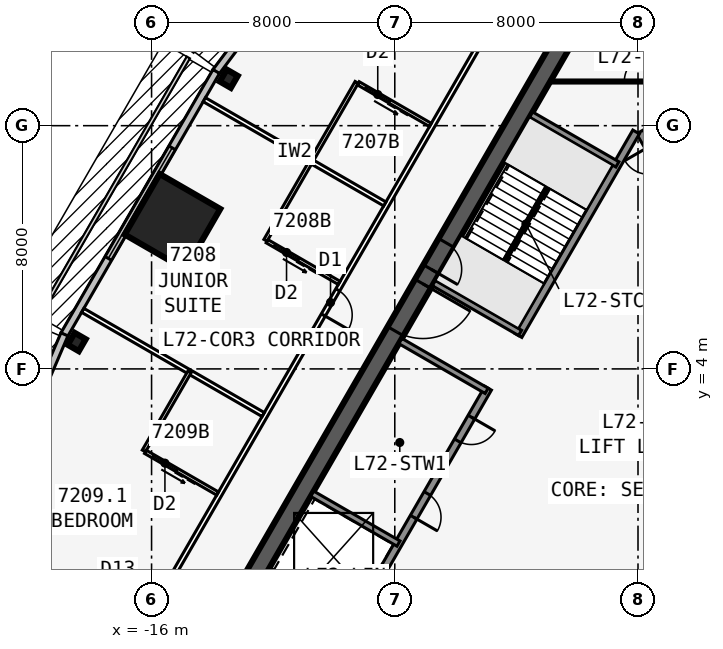
"""IFC4 building model, lengths in metres.
Left out: names, types, materials, properties, quantities, classifications, styles, units other than length and angle.
Written with IfcOpenShell. Run it as: python <this file> out.ifc"""

import sys

from ifc_helpers import new_model, si_unit, direction, frame, frame_2d, origin, origin_2d, place, context, subcontext, project, spatial, rectangle, i_section, extrude, element, fill, save


model = new_model("IFC4")
c1 = context("Model", 3, precision=1e-05, world=origin(), true_north=direction((0.0, 1.0)))
c2 = subcontext(c1, "Body", "Model", "MODEL_VIEW")
j1 = project(units=[si_unit("LENGTHUNIT", "METRE"), si_unit("PLANEANGLEUNIT", "RADIAN")], contexts=[c1])
p1 = place(None, origin())
s1 = spatial("IfcSite", under=j1, at=p1, CompositionType="ELEMENT")
p2 = place(p1, origin())
s2 = spatial("IfcBuilding", under=s1, at=p2, CompositionType="ELEMENT")
p3 = place(p2, frame((0.0, 0.0, 271.7)))
s3 = spatial("IfcBuildingStorey", under=s2, at=p3, CompositionType="ELEMENT", Elevation=271.7)
p4 = place(p3, frame((16.5, -9.526, 0.0), z_axis=(0.0, 0.0, 1.0), x_axis=(-0.499999749417, 0.866025548458, 0.0)))
e1 = element("IfcWall", 1, at=p4, inside=s3, PredefinedType="SHEAR", context=c2, shape_type="SweptSolid", body=[
    extrude(rectangle(XDim=33.0, YDim=0.6, at=frame_2d((16.5, 0.0))), origin(), (0.0, 0.0, 1.0), 3.6),
])
p5 = place(p4, frame((14.15, 0.0, 0.0)))
e2 = element("IfcOpeningElement", 2, at=p5, cuts=e1, PredefinedType="OPENING", context=c2, shape_type="SweptSolid", body=[
    extrude(rectangle(XDim=1.8, YDim=2.13, at=frame_2d((0.9, 1.065))), frame((0.0, 0.31, 0.0), z_axis=(0.0, -1.0, 0.0), x_axis=(1.0, 0.0, 0.0)), (0.0, 0.0, 1.0), 0.62),
])
p6 = place(p4, frame((12.6, 0.0, 0.0)))
e3 = element("IfcOpeningElement", 3, at=p6, cuts=e1, PredefinedType="OPENING", context=c2, shape_type="SweptSolid", body=[
    extrude(rectangle(XDim=1.0, YDim=2.13, at=frame_2d((0.5, 1.065))), frame((0.0, 0.31, 0.0), z_axis=(0.0, -1.0, 0.0), x_axis=(1.0, 0.0, 0.0)), (0.0, 0.0, 1.0), 0.62),
])
p7 = place(p3, frame((5.379, 2.586, 0.0), z_axis=(0.0, 0.0, 1.0), x_axis=(-0.500001375892, 0.866024609411, 0.0)))
e4 = element("IfcWall", 4, at=p7, inside=s3, PredefinedType="SOLIDWALL", context=c2, shape_type="SweptSolid", body=[
    extrude(rectangle(XDim=10.633, YDim=0.25, at=frame_2d((5.316, 0.0))), origin(), (0.0, 0.0, 1.0), 3.35),
])
p8 = place(p7, frame((9.164, 0.0, 0.0)))
e5 = element("IfcOpeningElement", 5, at=p8, cuts=e4, PredefinedType="OPENING", context=c2, shape_type="SweptSolid", body=[
    extrude(rectangle(XDim=0.9, YDim=2.13, at=frame_2d((0.45, 1.065))), frame((0.0, 0.135, 0.0), z_axis=(0.0, -1.0, 0.0), x_axis=(1.0, 0.0, 0.0)), (0.0, 0.0, 1.0), 0.27),
])
p9 = place(p7, frame((1.0, 0.0, 0.0)))
e6 = element("IfcOpeningElement", 6, at=p9, cuts=e4, PredefinedType="OPENING", context=c2, shape_type="SweptSolid", body=[
    extrude(rectangle(XDim=1.1, YDim=2.13, at=frame_2d((0.55, 1.065))), frame((0.0, 0.135, 0.0), z_axis=(0.0, -1.0, 0.0), x_axis=(1.0, 0.0, 0.0)), (0.0, 0.0, 1.0), 0.27),
])
p10 = place(p7, frame((3.9, 0.0, 0.0)))
e7 = element("IfcOpeningElement", 7, at=p10, cuts=e4, PredefinedType="OPENING", context=c2, shape_type="SweptSolid", body=[
    extrude(rectangle(XDim=1.1, YDim=2.13, at=frame_2d((0.55, 1.065))), frame((0.0, 0.135, 0.0), z_axis=(0.0, -1.0, 0.0), x_axis=(1.0, 0.0, 0.0)), (0.0, 0.0, 1.0), 0.27),
])
p11 = place(p7, frame((6.8, 0.0, 0.0)))
e8 = element("IfcOpeningElement", 8, at=p11, cuts=e4, PredefinedType="OPENING", context=c2, shape_type="SweptSolid", body=[
    extrude(rectangle(XDim=1.1, YDim=2.13, at=frame_2d((0.55, 1.065))), frame((0.0, 0.135, 0.0), z_axis=(0.0, -1.0, 0.0), x_axis=(1.0, 0.0, 0.0)), (0.0, 0.0, 1.0), 0.27),
])
p12 = place(p3, frame((0.0, 19.052, 0.0), z_axis=(0.0, 0.0, 1.0), x_axis=(-0.499999749417, -0.866025548458, 0.0)))
e9 = element("IfcWall", 9, at=p12, inside=s3, PredefinedType="SHEAR", context=c2, shape_type="SweptSolid", body=[
    extrude(rectangle(XDim=33.0, YDim=0.6, at=frame_2d((16.5, 0.0))), origin(), (0.0, 0.0, 1.0), 3.6),
])
p13 = place(p12, frame((14.15, 0.0, 0.0)))
e10 = element("IfcOpeningElement", 10, at=p13, cuts=e9, PredefinedType="OPENING", context=c2, shape_type="SweptSolid", body=[
    extrude(rectangle(XDim=1.8, YDim=2.13, at=frame_2d((0.9, 1.065))), frame((0.0, 0.31, 0.0), z_axis=(0.0, -1.0, 0.0), x_axis=(1.0, 0.0, 0.0)), (0.0, 0.0, 1.0), 0.62),
])
p14 = place(p12, frame((12.6, 0.0, 0.0)))
e11 = element("IfcOpeningElement", 11, at=p14, cuts=e9, PredefinedType="OPENING", context=c2, shape_type="SweptSolid", body=[
    extrude(rectangle(XDim=1.0, YDim=2.13, at=frame_2d((0.5, 1.065))), frame((0.0, 0.31, 0.0), z_axis=(0.0, -1.0, 0.0), x_axis=(1.0, 0.0, 0.0)), (0.0, 0.0, 1.0), 0.62),
])
p15 = place(p3, frame((-0.062, 11.794, 0.0), z_axis=(0.0, 0.0, 1.0), x_axis=(-0.500006680225, -0.86602154692, 0.0)))
e12 = element("IfcWall", 12, at=p15, inside=s3, PredefinedType="SOLIDWALL", context=c2, shape_type="SweptSolid", body=[
    extrude(rectangle(XDim=7.733, YDim=0.25, at=frame_2d((3.866, 0.0))), origin(), (0.0, 0.0, 1.0), 3.35),
])
p16 = place(p3, frame((-4.929, 3.365, 0.0), z_axis=(0.0, 0.0, 1.0), x_axis=(-0.499991433582, -0.866030349552, 0.0)))
e13 = element("IfcWall", 13, at=p16, inside=s3, PredefinedType="SOLIDWALL", context=c2, shape_type="SweptSolid", body=[
    extrude(rectangle(XDim=10.633, YDim=0.25, at=frame_2d((5.316, 0.0))), origin(), (0.0, 0.0, 1.0), 3.35),
])
p17 = place(p16, frame((9.164, 0.0, 0.0)))
e14 = element("IfcOpeningElement", 14, at=p17, cuts=e13, PredefinedType="OPENING", context=c2, shape_type="SweptSolid", body=[
    extrude(rectangle(XDim=0.9, YDim=2.13, at=frame_2d((0.45, 1.065))), frame((0.0, 0.135, 0.0), z_axis=(0.0, -1.0, 0.0), x_axis=(1.0, 0.0, 0.0)), (0.0, 0.0, 1.0), 0.27),
])
p18 = place(p16, frame((1.1, 0.0, 0.0)))
e15 = element("IfcOpeningElement", 15, at=p18, cuts=e13, PredefinedType="OPENING", context=c2, shape_type="SweptSolid", body=[
    extrude(rectangle(XDim=0.9, YDim=2.13, at=frame_2d((0.45, 1.065))), frame((0.0, 0.135, 0.0), z_axis=(0.0, -1.0, 0.0), x_axis=(1.0, 0.0, 0.0)), (0.0, 0.0, 1.0), 0.27),
])
p19 = place(p16, frame((4.0, 0.0, 0.0)))
e16 = element("IfcOpeningElement", 16, at=p19, cuts=e13, PredefinedType="OPENING", context=c2, shape_type="SweptSolid", body=[
    extrude(rectangle(XDim=0.9, YDim=2.13, at=frame_2d((0.45, 1.065))), frame((0.0, 0.135, 0.0), z_axis=(0.0, -1.0, 0.0), x_axis=(1.0, 0.0, 0.0)), (0.0, 0.0, 1.0), 0.27),
])
for number, where, z_axis, x_axis in (
    (17, (-0.679, 10.727, 0.0), (0.0, 0.0, 1.0), (-0.866, 0.5, 0.0)),
    (18, (-3.879, 5.184, 0.0), (0.0, 0.0, 1.0), (-0.866, 0.5, 0.0)),
    (19, (-4.979, 3.279, 0.0), (0.0, 0.0, 1.0), (-0.866, 0.5, 0.0)),
    (20, (-7.879, -1.744, 0.0), (0.0, 0.0, 1.0), (-0.866, 0.5, 0.0)),
    (21, (-9.329, -4.256, 0.0), (0.0, 0.0, 1.0), (-0.866, 0.5, 0.0)),
):
    element("IfcWall", number, at=place(p3, frame(where, z_axis=z_axis, x_axis=x_axis)), inside=s3, PredefinedType="SOLIDWALL", context=c2, shape_type="SweptSolid", body=[
        extrude(rectangle(XDim=3.275, YDim=0.2, at=frame_2d((1.637, 0.0))), origin(), (0.0, 0.0, 1.0), 3.35),
    ])
for number, where, z_axis, x_axis in (
    (22, (-13.461, 13.545, 0.0), (0.0, 0.0, 1.0), (-0.866, 0.5, 0.0)),
    (23, (-18.461, 4.885, 0.0), (0.0, 0.0, 1.0), (-0.866, 0.5, 0.0)),
):
    element("IfcColumn", number, at=place(p3, frame(where, z_axis=z_axis, x_axis=x_axis)), inside=s3, PredefinedType="COLUMN", context=c2, shape_type="SweptSolid", body=[
        extrude(i_section(OverallWidth=0.419, OverallDepth=0.455, WebThickness=0.042, FlangeThickness=0.068, at=origin_2d()), origin(), (0.0, 0.0, 1.0), 3.6),
    ])
p20 = place(p3, frame((-15.312, 8.84, 0.0), z_axis=(0.0, 0.0, 1.0), x_axis=(-0.866025403784, 0.5, 0.0)))
e24 = element("IfcColumn", 24, at=p20, inside=s3, PredefinedType="COLUMN", context=c2, shape_type="SweptSolid", body=[
    extrude(rectangle(XDim=2.3, YDim=2.3, at=origin_2d()), origin(), (0.0, 0.0, 1.0), 3.6),
])
p21 = place(p3, frame((-12.673, 15.382, 0.0), z_axis=(0.0, 0.0, 1.0), x_axis=(-0.599650843534, -0.800261748335, 0.0)))
e25 = element("IfcWall", 25, at=p21, inside=s3, PredefinedType="STANDARD", context=c2, shape_type="SweptSolid", body=[
    extrude(rectangle(XDim=2.014, YDim=0.25, at=frame_2d((1.007, 0.0))), origin(), (0.0, 0.0, 1.0), 3.35),
])
p22 = place(p3, frame((-13.873, 13.783, 0.0), z_axis=(0.0, 0.0, 1.0), x_axis=(-0.499993662806, -0.866029062534, 0.0)))
e26 = element("IfcWall", 26, at=p22, inside=s3, PredefinedType="STANDARD", context=c2, shape_type="SweptSolid", body=[
    extrude(rectangle(XDim=10.0, YDim=0.25, at=frame_2d((5.0, 0.0))), origin(), (0.0, 0.0, 1.0), 3.35),
])
p23 = place(p22, frame((2.9, 0.0, 0.45)))
e27 = element("IfcOpeningElement", 27, at=p23, cuts=e26, PredefinedType="OPENING", context=c2, shape_type="SweptSolid", body=[
    extrude(rectangle(XDim=4.2, YDim=2.6, at=frame_2d((2.1, 1.3))), frame((0.0, 0.135, 0.0), z_axis=(0.0, -1.0, 0.0), x_axis=(1.0, 0.0, 0.0)), (0.0, 0.0, 1.0), 0.27),
])
p24 = place(p3, frame((-18.866, 5.136, 0.0), z_axis=(0.0, 0.0, 1.0), x_axis=(-0.393290226175, -0.91941437774, 0.0)))
e28 = element("IfcWall", 28, at=p24, inside=s3, PredefinedType="STANDARD", context=c2, shape_type="SweptSolid", body=[
    extrude(rectangle(XDim=2.014, YDim=0.25, at=frame_2d((1.007, 0.0))), origin(), (0.0, 0.0, 1.0), 3.35),
])
p25 = place(p3, frame((-0.35, 23.096, 0.0), z_axis=(0.0, 0.0, 1.0), x_axis=(-0.499998875317, -0.866026053119, 0.0)))
e29 = element("IfcWall", 29, at=p25, inside=s3, PredefinedType="PARTITIONING", context=c2, shape_type="SweptSolid", body=[
    extrude(rectangle(XDim=39.654, YDim=0.15, at=frame_2d((19.827, 0.0))), origin(), (0.0, 0.0, 1.0), 3.35),
])
p26 = place(p25, frame((3.272, 0.0, 0.0)))
e30 = element("IfcOpeningElement", 30, at=p26, cuts=e29, PredefinedType="OPENING", context=c2, shape_type="SweptSolid", body=[
    extrude(rectangle(XDim=0.95, YDim=2.13, at=frame_2d((0.475, 1.065))), frame((0.0, 0.085, 0.0), z_axis=(0.0, -1.0, 0.0), x_axis=(1.0, 0.0, 0.0)), (0.0, 0.0, 1.0), 0.17),
])
p27 = place(p25, frame((19.052, 0.0, 0.0)))
e31 = element("IfcOpeningElement", 31, at=p27, cuts=e29, PredefinedType="OPENING", context=c2, shape_type="SweptSolid", body=[
    extrude(rectangle(XDim=0.95, YDim=2.13, at=frame_2d((0.475, 1.065))), frame((0.0, 0.085, 0.0), z_axis=(0.0, -1.0, 0.0), x_axis=(1.0, 0.0, 0.0)), (0.0, 0.0, 1.0), 0.17),
])
p28 = place(p25, frame((35.432, 0.0, 0.0)))
e32 = element("IfcOpeningElement", 32, at=p28, cuts=e29, PredefinedType="OPENING", context=c2, shape_type="SweptSolid", body=[
    extrude(rectangle(XDim=0.95, YDim=2.13, at=frame_2d((0.475, 1.065))), frame((0.0, 0.085, 0.0), z_axis=(0.0, -1.0, 0.0), x_axis=(1.0, 0.0, 0.0)), (0.0, 0.0, 1.0), 0.17),
])
p29 = place(p3, frame((-8.329, 9.427, 0.0), z_axis=(0.0, 0.0, 1.0), x_axis=(-0.866011785882, 0.500023586156, 0.0)))
e33 = element("IfcWall", 33, at=p29, inside=s3, PredefinedType="PARTITIONING", context=c2, shape_type="SweptSolid", body=[
    extrude(rectangle(XDim=6.854, YDim=0.15, at=frame_2d((3.427, 0.0))), origin(), (0.0, 0.0, 1.0), 3.35),
])
p30 = place(p3, frame((-12.329, 2.499, 0.0), z_axis=(0.0, 0.0, 1.0), x_axis=(-0.866027209835, 0.499996871816, 0.0)))
e34 = element("IfcWall", 34, at=p30, inside=s3, PredefinedType="PARTITIONING", context=c2, shape_type="SweptSolid", body=[
    extrude(rectangle(XDim=6.854, YDim=0.15, at=frame_2d((3.427, 0.0))), origin(), (0.0, 0.0, 1.0), 3.35),
])
p31 = place(p3, frame((-16.329, -4.429, 0.0), z_axis=(0.0, 0.0, 1.0), x_axis=(-0.866029066823, 0.499993655377, 0.0)))
e35 = element("IfcWall", 35, at=p31, inside=s3, PredefinedType="PARTITIONING", context=c2, shape_type="SweptSolid", body=[
    extrude(rectangle(XDim=5.559, YDim=0.1, at=frame_2d((2.779, 0.0))), origin(), (0.0, 0.0, 1.0), 2.301),
])
p32 = place(p31, frame((0.45, 0.0, 0.0)))
e36 = element("IfcOpeningElement", 36, at=p32, cuts=e35, PredefinedType="OPENING", context=c2, shape_type="SweptSolid", body=[
    extrude(rectangle(XDim=0.9, YDim=2.13, at=frame_2d((0.45, 1.065))), frame((0.0, 0.06, 0.0), z_axis=(0.0, -1.0, 0.0), x_axis=(1.0, 0.0, 0.0)), (0.0, 0.0, 1.0), 0.12),
])
p33 = place(p3, frame((-9.253, 13.425, 0.0), z_axis=(0.0, 0.0, 1.0), x_axis=(-0.499990139034, -0.866031096941, 0.0)))
e37 = element("IfcWall", 37, at=p33, inside=s3, PredefinedType="PLUMBINGWALL", context=c2, shape_type="SweptSolid", body=[
    extrude(rectangle(XDim=3.0, YDim=0.12, at=frame_2d((1.5, 0.0))), origin(), (0.0, 0.0, 1.0), 3.35),
])
p34 = place(p3, frame((-6.829, 12.025, 0.0), z_axis=(0.0, 0.0, 1.0), x_axis=(-0.866035715982, 0.499982138324, 0.0)))
e38 = element("IfcWall", 38, at=p34, inside=s3, PredefinedType="PLUMBINGWALL", context=c2, shape_type="SweptSolid", body=[
    extrude(rectangle(XDim=2.74, YDim=0.12, at=frame_2d((1.37, 0.0))), origin(), (0.0, 0.0, 1.0), 2.309),
])
p35 = place(p34, frame((1.55, 0.0, 0.0)))
e39 = element("IfcOpeningElement", 39, at=p35, cuts=e38, PredefinedType="OPENING", context=c2, shape_type="SweptSolid", body=[
    extrude(rectangle(XDim=0.9, YDim=2.13, at=frame_2d((0.45, 1.065))), frame((0.0, 0.07, 0.0), z_axis=(0.0, -1.0, 0.0), x_axis=(1.0, 0.0, 0.0)), (0.0, 0.0, 1.0), 0.14),
])
p36 = place(p3, frame((-10.753, 10.827, 0.0), z_axis=(0.0, 0.0, 1.0), x_axis=(-0.50002537861, -0.866010750942, 0.0)))
e40 = element("IfcWall", 40, at=p36, inside=s3, PredefinedType="PLUMBINGWALL", context=c2, shape_type="SweptSolid", body=[
    extrude(rectangle(XDim=3.0, YDim=0.12, at=frame_2d((1.5, 0.0))), origin(), (0.0, 0.0, 1.0), 3.35),
])
p37 = place(p3, frame((-9.829, 6.829, 0.0), z_axis=(0.0, 0.0, 1.0), x_axis=(-0.865997131366, 0.500048966069, 0.0)))
e41 = element("IfcWall", 41, at=p37, inside=s3, PredefinedType="PLUMBINGWALL", context=c2, shape_type="SweptSolid", body=[
    extrude(rectangle(XDim=2.74, YDim=0.12, at=frame_2d((1.37, 0.0))), origin(), (0.0, 0.0, 1.0), 3.35),
])
p38 = place(p37, frame((1.55, 0.0, 0.0)))
e42 = element("IfcOpeningElement", 42, at=p38, cuts=e41, PredefinedType="OPENING", context=c2, shape_type="SweptSolid", body=[
    extrude(rectangle(XDim=0.9, YDim=2.13, at=frame_2d((0.45, 1.065))), frame((0.0, 0.07, 0.0), z_axis=(0.0, -1.0, 0.0), x_axis=(1.0, 0.0, 0.0)), (0.0, 0.0, 1.0), 0.14),
])
p39 = place(p3, frame((-14.753, 3.899, 0.0), z_axis=(0.0, 0.0, 1.0), x_axis=(-0.50002537861, -0.866010750942, 0.0)))
e43 = element("IfcWall", 43, at=p39, inside=s3, PredefinedType="PLUMBINGWALL", context=c2, shape_type="SweptSolid", body=[
    extrude(rectangle(XDim=3.0, YDim=0.12, at=frame_2d((1.5, 0.0))), origin(), (0.0, 0.0, 1.0), 3.35),
])
p40 = place(p3, frame((-13.829, -0.099, 0.0), z_axis=(0.0, 0.0, 1.0), x_axis=(-0.865997131366, 0.500048966069, 0.0)))
e44 = element("IfcWall", 44, at=p40, inside=s3, PredefinedType="PLUMBINGWALL", context=c2, shape_type="SweptSolid", body=[
    extrude(rectangle(XDim=2.74, YDim=0.12, at=frame_2d((1.37, 0.0))), origin(), (0.0, 0.0, 1.0), 2.309),
])
p41 = place(p40, frame((1.55, 0.0, 0.0)))
e45 = element("IfcOpeningElement", 45, at=p41, cuts=e44, PredefinedType="OPENING", context=c2, shape_type="SweptSolid", body=[
    extrude(rectangle(XDim=0.9, YDim=2.13, at=frame_2d((0.45, 1.065))), frame((0.0, 0.07, 0.0), z_axis=(0.0, -1.0, 0.0), x_axis=(1.0, 0.0, 0.0)), (0.0, 0.0, 1.0), 0.14),
])
p42 = place(p3, frame((-2.887, 13.453, 0.0), z_axis=(0.0, 0.0, 1.0), x_axis=(1.0, 0.0, 0.0)))
e46 = element("IfcWall", 46, at=p42, inside=s3, PredefinedType="PARTITIONING", context=c2, shape_type="SweptSolid", body=[
    extrude(rectangle(XDim=5.773, YDim=0.1, at=frame_2d((2.887, 0.0))), origin(), (0.0, 0.0, 1.0), 3.35),
])
p43 = place(p42, frame((2.437, 0.0, 0.0)))
e47 = element("IfcOpeningElement", 47, at=p43, cuts=e46, PredefinedType="OPENING", context=c2, shape_type="SweptSolid", body=[
    extrude(rectangle(XDim=0.9, YDim=2.13, at=frame_2d((0.45, 1.065))), frame((0.0, 0.06, 0.0), z_axis=(0.0, -1.0, 0.0), x_axis=(1.0, 0.0, 0.0)), (0.0, 0.0, 1.0), 0.12),
])
p44 = place(p3, frame((-2.988, 9.978, 0.0), z_axis=(0.0, 0.0, 1.0), x_axis=(-0.499992232847, -0.866029888106, 0.0)))
e48 = element("IfcWall", 48, at=p44, inside=s3, PredefinedType="SOLIDWALL", context=c2, shape_type="SweptSolid", body=[
    extrude(rectangle(XDim=2.794, YDim=0.1, at=frame_2d((1.397, 0.0))), origin(), (0.0, 0.0, 1.0), 3.6),
])
p45 = place(p23, origin())
e49 = element("IfcWindow", 49, at=p45, inside=s3, PartitioningType="SINGLE_PANEL", PredefinedType="WINDOW", context=c2, shape_type="SweptSolid", body=[
    extrude(rectangle(XDim=4.2, YDim=2.6, at=frame_2d((2.1, 1.3))), frame((0.0, 0.03, 0.0), z_axis=(0.0, -1.0, 0.0), x_axis=(1.0, 0.0, 0.0)), (0.0, 0.0, 1.0), 0.06),
])
fill(e27, e49)
p46 = place(p35, origin())
e50 = element("IfcDoor", 50, at=p46, inside=s3, OperationType="SLIDING_TO_LEFT", PredefinedType="DOOR", context=c2, shape_type="SweptSolid", body=[
    extrude(rectangle(XDim=0.9, YDim=2.13, at=frame_2d((0.45, 1.065))), frame((0.0, 0.025, 0.0), z_axis=(0.0, -1.0, 0.0), x_axis=(1.0, 0.0, 0.0)), (0.0, 0.0, 1.0), 0.05),
])
fill(e39, e50)
p47 = place(p38, origin())
e51 = element("IfcDoor", 51, at=p47, inside=s3, OperationType="SLIDING_TO_LEFT", PredefinedType="DOOR", context=c2, shape_type="SweptSolid", body=[
    extrude(rectangle(XDim=0.9, YDim=2.13, at=frame_2d((0.45, 1.065))), frame((0.0, 0.025, 0.0), z_axis=(0.0, -1.0, 0.0), x_axis=(1.0, 0.0, 0.0)), (0.0, 0.0, 1.0), 0.05),
])
fill(e42, e51)
p48 = place(p27, origin())
e52 = element("IfcDoor", 52, at=p48, inside=s3, OperationType="SINGLE_SWING_RIGHT", PredefinedType="DOOR", context=c2, shape_type="SweptSolid", body=[
    extrude(rectangle(XDim=0.95, YDim=2.13, at=frame_2d((0.475, 1.065))), frame((0.0, 0.025, 0.0), z_axis=(0.0, -1.0, 0.0), x_axis=(1.0, 0.0, 0.0)), (0.0, 0.0, 1.0), 0.05),
])
fill(e31, e52)
p49 = place(p41, origin())
e53 = element("IfcDoor", 53, at=p49, inside=s3, OperationType="SLIDING_TO_LEFT", PredefinedType="DOOR", context=c2, shape_type="SweptSolid", body=[
    extrude(rectangle(XDim=0.9, YDim=2.13, at=frame_2d((0.45, 1.065))), frame((0.0, 0.025, 0.0), z_axis=(0.0, -1.0, 0.0), x_axis=(1.0, 0.0, 0.0)), (0.0, 0.0, 1.0), 0.05),
])
fill(e45, e53)
p50 = place(p13, origin())
e54 = element("IfcDoor", 54, at=p50, inside=s3, OperationType="DOUBLE_DOOR_SINGLE_SWING", PredefinedType="DOOR", context=c2, shape_type="SweptSolid", body=[
    extrude(rectangle(XDim=1.8, YDim=2.13, at=frame_2d((0.9, 1.065))), frame((0.0, 0.025, 0.0), z_axis=(0.0, -1.0, 0.0), x_axis=(1.0, 0.0, 0.0)), (0.0, 0.0, 1.0), 0.05),
])
fill(e10, e54)
p51 = place(p14, origin())
e55 = element("IfcDoor", 55, at=p51, inside=s3, OperationType="SINGLE_SWING_RIGHT", PredefinedType="DOOR", context=c2, shape_type="SweptSolid", body=[
    extrude(rectangle(XDim=1.0, YDim=2.13, at=frame_2d((0.5, 1.065))), frame((0.0, 0.025, 0.0), z_axis=(0.0, -1.0, 0.0), x_axis=(1.0, 0.0, 0.0)), (0.0, 0.0, 1.0), 0.05),
])
fill(e11, e55)
p52 = place(p43, origin())
e56 = element("IfcDoor", 56, at=p52, inside=s3, OperationType="SINGLE_SWING_RIGHT", PredefinedType="DOOR", context=c2, shape_type="SweptSolid", body=[
    extrude(rectangle(XDim=0.9, YDim=2.13, at=frame_2d((0.45, 1.065))), frame((0.0, 0.025, 0.0), z_axis=(0.0, -1.0, 0.0), x_axis=(1.0, 0.0, 0.0)), (0.0, 0.0, 1.0), 0.05),
])
fill(e47, e56)
p53 = place(p18, origin())
e57 = element("IfcDoor", 57, at=p53, inside=s3, OperationType="SINGLE_SWING_LEFT", PredefinedType="DOOR", context=c2, shape_type="SweptSolid", body=[
    extrude(rectangle(XDim=0.9, YDim=2.13, at=frame_2d((0.45, 1.065))), frame((0.0, 0.025, 0.0), z_axis=(0.0, -1.0, 0.0), x_axis=(1.0, 0.0, 0.0)), (0.0, 0.0, 1.0), 0.05),
])
fill(e15, e57)
p54 = place(p19, origin())
e58 = element("IfcDoor", 58, at=p54, inside=s3, OperationType="SINGLE_SWING_RIGHT", PredefinedType="DOOR", context=c2, shape_type="SweptSolid", body=[
    extrude(rectangle(XDim=0.9, YDim=2.13, at=frame_2d((0.45, 1.065))), frame((0.0, 0.025, 0.0), z_axis=(0.0, -1.0, 0.0), x_axis=(1.0, 0.0, 0.0)), (0.0, 0.0, 1.0), 0.05),
])
fill(e16, e58)
save(model, sys.argv[1])
